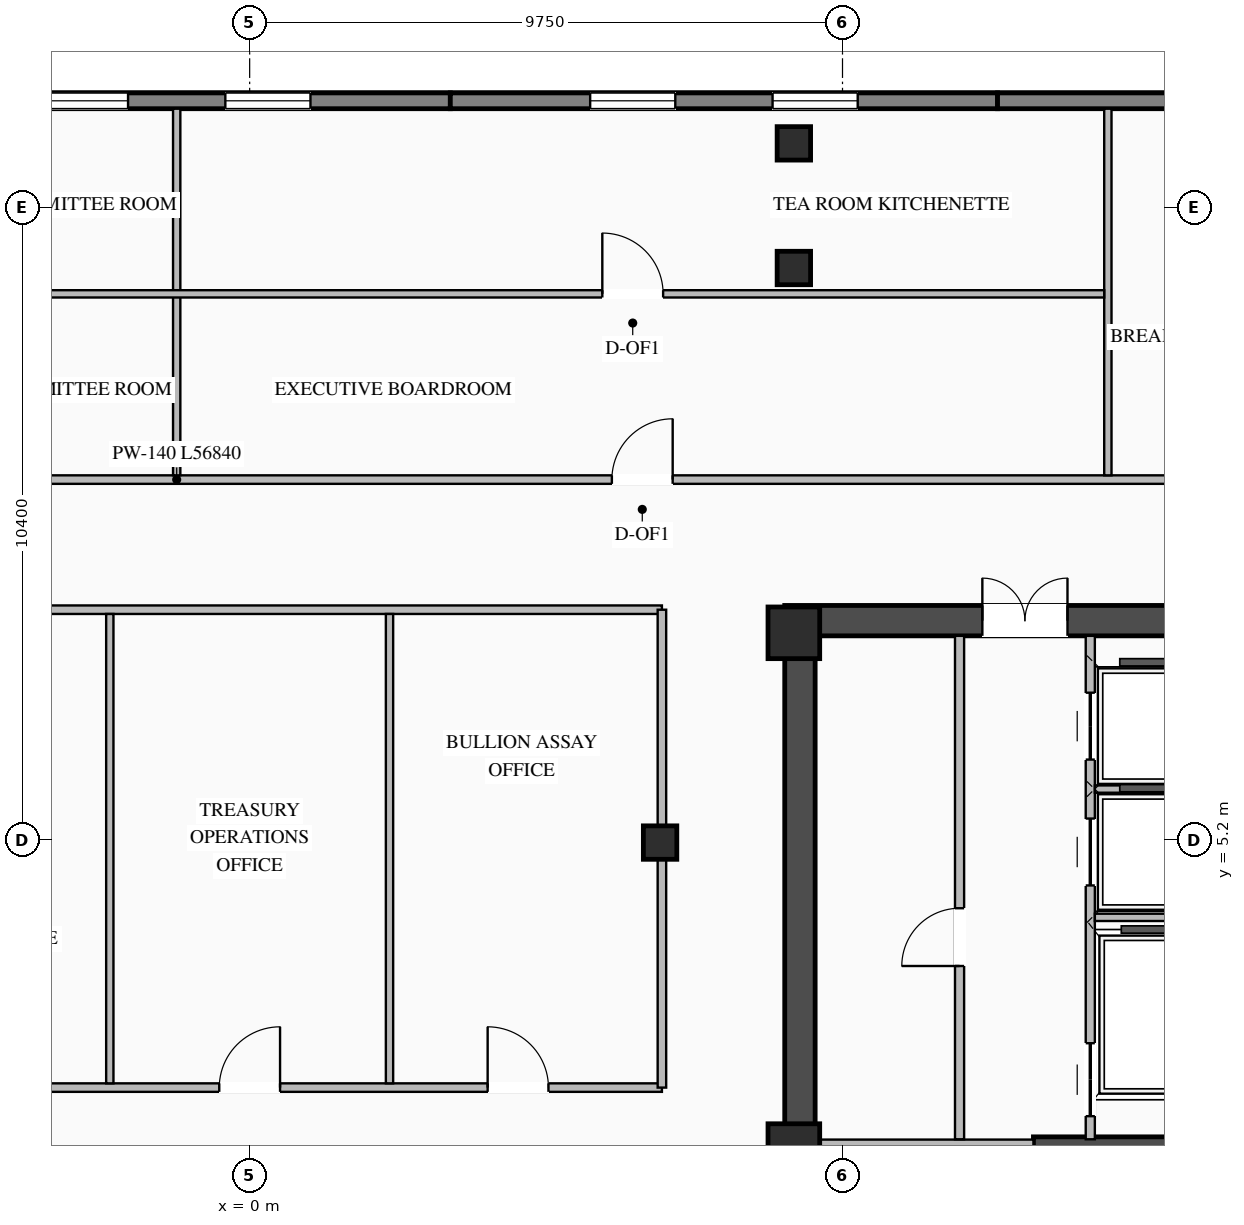
"""IFC4 building model, lengths in metres.
Left out: names, types, materials, properties, quantities, classifications, styles, units other than length and angle.
Written with IfcOpenShell. Run it as: python <this file> out.ifc"""

import sys

from ifc_helpers import new_model, si_unit, direction, frame, frame_2d, origin, origin_2d, place, context, subcontext, project, spatial, rectangle, i_section, extrude, element, fill, save


model = new_model("IFC4")
c1 = context("Model", 3, precision=1e-05, world=origin(), true_north=direction((0.0, 1.0)))
c2 = subcontext(c1, "Body", "Model", "MODEL_VIEW")
j1 = project(units=[si_unit("LENGTHUNIT", "METRE"), si_unit("PLANEANGLEUNIT", "RADIAN")], contexts=[c1])
p1 = place(None, origin())
s1 = spatial("IfcSite", under=j1, at=p1, CompositionType="ELEMENT")
p2 = place(p1, origin())
s2 = spatial("IfcBuilding", under=s1, at=p2, CompositionType="ELEMENT")
p3 = place(p2, frame((0.0, 0.0, 229.2)))
s3 = spatial("IfcBuildingStorey", under=s2, at=p3, CompositionType="ELEMENT", Elevation=229.2)
p4 = place(p3, frame((8.8, 8.8, 0.0), z_axis=(0.0, 0.0, 1.0), x_axis=(1.0, 0.0, 0.0)))
e1 = element("IfcWall", 1, at=p4, inside=s3, PredefinedType="SHEAR", context=c2, shape_type="SweptSolid", body=[
    extrude(rectangle(XDim=10.25, YDim=0.5, at=frame_2d((5.125, 0.0))), origin(), (0.0, 0.0, 1.0), 3.27),
])
p5 = place(p4, frame((3.25, 0.0, 0.0)))
e2 = element("IfcOpeningElement", 2, at=p5, cuts=e1, PredefinedType="OPENING", context=c2, shape_type="SweptSolid", body=[
    extrude(rectangle(XDim=1.4, YDim=2.05, at=frame_2d((0.7, 1.025))), frame((0.0, 0.26, 0.0), z_axis=(0.0, -1.0, 0.0), x_axis=(1.0, 0.0, 0.0)), (0.0, 0.0, 1.0), 0.52),
])
p6 = place(p3, frame((9.05, -8.55, 0.0), z_axis=(0.0, 0.0, 1.0), x_axis=(0.0, 1.0, 0.0)))
e3 = element("IfcWall", 3, at=p6, inside=s3, PredefinedType="SHEAR", context=c2, shape_type="SweptSolid", body=[
    extrude(rectangle(XDim=17.1, YDim=0.5, at=frame_2d((8.55, 0.0))), origin(), (0.0, 0.0, 1.0), 3.27),
])
p7 = place(p6, frame((5.3, 0.0, 0.0)))
e4 = element("IfcOpeningElement", 4, at=p7, cuts=e3, PredefinedType="OPENING", context=c2, shape_type="SweptSolid", body=[
    extrude(rectangle(XDim=1.1, YDim=2.08, at=frame_2d((0.55, 1.04))), frame((0.0, 0.26, 0.0), z_axis=(0.0, -1.0, 0.0), x_axis=(1.0, 0.0, 0.0)), (0.0, 0.0, 1.0), 0.52),
])
p8 = place(p3, frame((18.03, 0.205, 0.0), z_axis=(0.0, 0.0, 1.0), x_axis=(-1.0, 0.0, 0.0)))
e5 = element("IfcWall", 5, at=p8, inside=s3, PredefinedType="SHEAR", context=c2, shape_type="SweptSolid", body=[
    extrude(rectangle(XDim=5.14, YDim=0.21, at=frame_2d((2.57, 0.0))), origin(), (0.0, 0.0, 1.0), 3.27),
])
for number, where, z_axis, x_axis in (
    (6, (8.95, 0.1, 0.0), (0.0, 0.0, 1.0), (1.0, 0.0, 0.0)),
    (7, (8.95, 8.6, 0.0), (0.0, 0.0, 1.0), (1.0, 0.0, 0.0)),
):
    element("IfcColumn", number, at=place(p3, frame(where, z_axis=z_axis, x_axis=x_axis)), inside=s3, PredefinedType="COLUMN", context=c2, shape_type="SweptSolid", body=[
        extrude(rectangle(XDim=0.85, YDim=0.85, at=origin_2d()), origin(), (0.0, 0.0, 1.0), 3.45),
    ])
for number, where, z_axis, x_axis in (
    (8, (6.75, 5.15, 0.0), (0.0, 0.0, 1.0), (1.0, 0.0, 0.0)),
    (9, (8.95, 14.6, 0.0), (0.0, 0.0, 1.0), (1.0, 0.0, 0.0)),
    (10, (8.95, 16.65, 0.0), (0.0, 0.0, 1.0), (1.0, 0.0, 0.0)),
):
    element("IfcColumn", number, at=place(p3, frame(where, z_axis=z_axis, x_axis=x_axis)), inside=s3, PredefinedType="COLUMN", context=c2, shape_type="SweptSolid", body=[
        extrude(i_section(OverallWidth=0.55, OverallDepth=0.55, WebThickness=0.024, FlangeThickness=0.036, at=origin_2d()), origin(), (0.0, 0.0, 1.0), 3.45),
    ])
p9 = place(p3, frame((-5.7, 17.35, 0.0), z_axis=(0.0, 0.0, 1.0), x_axis=(1.0, 0.0, 0.0)))
e11 = element("IfcWall", 11, at=p9, inside=s3, PredefinedType="STANDARD", context=c2, shape_type="SweptSolid", body=[
    extrude(rectangle(XDim=9.0, YDim=0.26, at=frame_2d((4.5, 0.0))), origin(), (0.0, 0.0, 1.0), 3.25),
])
p10 = place(p9, frame((2.3, 0.0, 0.76)))
e12 = element("IfcOpeningElement", 12, at=p10, cuts=e11, PredefinedType="OPENING", context=c2, shape_type="SweptSolid", body=[
    extrude(rectangle(XDim=1.4, YDim=1.95, at=frame_2d((0.7, 0.975))), frame((0.0, 0.14, 0.0), z_axis=(0.0, -1.0, 0.0), x_axis=(1.0, 0.0, 0.0)), (0.0, 0.0, 1.0), 0.28),
])
p11 = place(p9, frame((5.3, 0.0, 0.76)))
e13 = element("IfcOpeningElement", 13, at=p11, cuts=e11, PredefinedType="OPENING", context=c2, shape_type="SweptSolid", body=[
    extrude(rectangle(XDim=1.4, YDim=1.95, at=frame_2d((0.7, 0.975))), frame((0.0, 0.14, 0.0), z_axis=(0.0, -1.0, 0.0), x_axis=(1.0, 0.0, 0.0)), (0.0, 0.0, 1.0), 0.28),
])
p12 = place(p3, frame((3.3, 17.35, 0.0), z_axis=(0.0, 0.0, 1.0), x_axis=(1.0, 0.0, 0.0)))
e14 = element("IfcWall", 14, at=p12, inside=s3, PredefinedType="STANDARD", context=c2, shape_type="SweptSolid", body=[
    extrude(rectangle(XDim=9.0, YDim=0.26, at=frame_2d((4.5, 0.0))), origin(), (0.0, 0.0, 1.0), 3.25),
])
p13 = place(p12, frame((2.3, 0.0, 0.76)))
e15 = element("IfcOpeningElement", 15, at=p13, cuts=e14, PredefinedType="OPENING", context=c2, shape_type="SweptSolid", body=[
    extrude(rectangle(XDim=1.4, YDim=1.95, at=frame_2d((0.7, 0.975))), frame((0.0, 0.14, 0.0), z_axis=(0.0, -1.0, 0.0), x_axis=(1.0, 0.0, 0.0)), (0.0, 0.0, 1.0), 0.28),
])
p14 = place(p12, frame((5.3, 0.0, 0.76)))
e16 = element("IfcOpeningElement", 16, at=p14, cuts=e14, PredefinedType="OPENING", context=c2, shape_type="SweptSolid", body=[
    extrude(rectangle(XDim=1.4, YDim=1.95, at=frame_2d((0.7, 0.975))), frame((0.0, 0.14, 0.0), z_axis=(0.0, -1.0, 0.0), x_axis=(1.0, 0.0, 0.0)), (0.0, 0.0, 1.0), 0.28),
])
p15 = place(p3, frame((12.3, 17.35, 0.0), z_axis=(0.0, 0.0, 1.0), x_axis=(1.0, 0.0, 0.0)))
e17 = element("IfcWall", 17, at=p15, inside=s3, PredefinedType="STANDARD", context=c2, shape_type="SweptSolid", body=[
    extrude(rectangle(XDim=12.65, YDim=0.26, at=frame_2d((6.325, 0.0))), origin(), (0.0, 0.0, 1.0), 3.25),
])
p16 = place(p15, frame((3.517, 0.0, 0.76)))
e18 = element("IfcOpeningElement", 18, at=p16, cuts=e17, PredefinedType="OPENING", context=c2, shape_type="SweptSolid", body=[
    extrude(rectangle(XDim=1.4, YDim=1.95, at=frame_2d((0.7, 0.975))), frame((0.0, 0.14, 0.0), z_axis=(0.0, -1.0, 0.0), x_axis=(1.0, 0.0, 0.0)), (0.0, 0.0, 1.0), 0.28),
])
p17 = place(p15, frame((7.733, 0.0, 0.76)))
e19 = element("IfcOpeningElement", 19, at=p17, cuts=e17, PredefinedType="OPENING", context=c2, shape_type="SweptSolid", body=[
    extrude(rectangle(XDim=1.4, YDim=1.95, at=frame_2d((0.7, 0.975))), frame((0.0, 0.14, 0.0), z_axis=(0.0, -1.0, 0.0), x_axis=(1.0, 0.0, 0.0)), (0.0, 0.0, 1.0), 0.28),
])
p18 = place(p3, frame((9.3, 0.19, 0.0), z_axis=(0.0, 0.0, 1.0), x_axis=(1.0, 0.0, 0.0)))
e20 = element("IfcWall", 20, at=p18, inside=s3, PredefinedType="STANDARD", context=c2, shape_type="SweptSolid", body=[
    extrude(rectangle(XDim=3.59, YDim=0.15, at=frame_2d((1.795, 0.0))), origin(), (0.0, 0.0, 1.0), 2.645),
])
p19 = place(p3, frame((11.675, 0.27, 0.0), z_axis=(0.0, 0.0, 1.0), x_axis=(0.0, 1.0, 0.0)))
e21 = element("IfcWall", 21, at=p19, inside=s3, PredefinedType="STANDARD", context=c2, shape_type="SweptSolid", body=[
    extrude(rectangle(XDim=8.28, YDim=0.15, at=frame_2d((4.14, 0.0))), origin(), (0.0, 0.0, 1.0), 3.25),
])
p20 = place(p19, frame((2.85, 0.0, 0.0)))
e22 = element("IfcOpeningElement", 22, at=p20, cuts=e21, PredefinedType="OPENING", context=c2, shape_type="SweptSolid", body=[
    extrude(rectangle(XDim=0.95, YDim=2.05, at=frame_2d((0.475, 1.025))), frame((0.0, 0.085, 0.0), z_axis=(0.0, -1.0, 0.0), x_axis=(1.0, 0.0, 0.0)), (0.0, 0.0, 1.0), 0.17),
])
p21 = place(p3, frame((13.825, 0.27, 0.0), z_axis=(0.0, 0.0, 1.0), x_axis=(0.0, 1.0, 0.0)))
e23 = element("IfcWall", 23, at=p21, inside=s3, PredefinedType="STANDARD", context=c2, shape_type="SweptSolid", body=[
    extrude(rectangle(XDim=8.28, YDim=0.15, at=frame_2d((4.14, 0.0))), origin(), (0.0, 0.0, 1.0), 3.25),
])
p22 = place(p21, frame((4.175, 0.0, 0.0)))
e24 = element("IfcOpeningElement", 24, at=p22, cuts=e23, PredefinedType="OPENING", context=c2, shape_type="SweptSolid", body=[
    extrude(rectangle(XDim=1.1, YDim=2.1, at=frame_2d((0.55, 1.05))), frame((0.0, 0.085, 0.0), z_axis=(0.0, -1.0, 0.0), x_axis=(1.0, 0.0, 0.0)), (0.0, 0.0, 1.0), 0.17),
])
p23 = place(p21, frame((6.245, 0.0, 0.0)))
e25 = element("IfcOpeningElement", 25, at=p23, cuts=e23, PredefinedType="OPENING", context=c2, shape_type="SweptSolid", body=[
    extrude(rectangle(XDim=1.1, YDim=2.1, at=frame_2d((0.55, 1.05))), frame((0.0, 0.085, 0.0), z_axis=(0.0, -1.0, 0.0), x_axis=(1.0, 0.0, 0.0)), (0.0, 0.0, 1.0), 0.17),
])
p24 = place(p21, frame((0.38, 0.0, 0.0)))
e26 = element("IfcOpeningElement", 26, at=p24, cuts=e23, PredefinedType="OPENING", context=c2, shape_type="SweptSolid", body=[
    extrude(rectangle(XDim=1.2, YDim=2.1, at=frame_2d((0.6, 1.05))), frame((0.0, 0.085, 0.0), z_axis=(0.0, -1.0, 0.0), x_axis=(1.0, 0.0, 0.0)), (0.0, 0.0, 1.0), 0.17),
])
p25 = place(p3, frame((13.9, 3.92, 0.0), z_axis=(0.0, 0.0, 1.0), x_axis=(1.0, 0.0, 0.0)))
e27 = element("IfcWall", 27, at=p25, inside=s3, PredefinedType="STANDARD", context=c2, shape_type="SweptSolid", body=[
    extrude(rectangle(XDim=4.65, YDim=0.12, at=frame_2d((2.325, 0.0))), origin(), (0.0, 0.0, 1.0), 3.25),
])
p26 = place(p3, frame((13.9, 6.03, 0.0), z_axis=(0.0, 0.0, 1.0), x_axis=(1.0, 0.0, 0.0)))
e28 = element("IfcWall", 28, at=p26, inside=s3, PredefinedType="STANDARD", context=c2, shape_type="SweptSolid", body=[
    extrude(rectangle(XDim=2.1, YDim=0.12, at=frame_2d((1.05, 0.0))), origin(), (0.0, 0.0, 1.0), 3.25),
])
p27 = place(p3, frame((-29.62, 11.12, 0.0), z_axis=(0.0, 0.0, 1.0), x_axis=(1.0, 0.0, 0.0)))
e29 = element("IfcWall", 29, at=p27, inside=s3, PredefinedType="STANDARD", context=c2, shape_type="SweptSolid", body=[
    extrude(rectangle(XDim=56.84, YDim=0.14, at=frame_2d((28.42, 0.0))), origin(), (0.0, 0.0, 1.0), 3.25),
])
p28 = place(p27, frame((6.179, 0.0, 0.0)))
e30 = element("IfcOpeningElement", 30, at=p28, cuts=e29, PredefinedType="OPENING", context=c2, shape_type="SweptSolid", body=[
    extrude(rectangle(XDim=1.0, YDim=2.08, at=frame_2d((0.5, 1.04))), frame((0.0, 0.08, 0.0), z_axis=(0.0, -1.0, 0.0), x_axis=(1.0, 0.0, 0.0)), (0.0, 0.0, 1.0), 0.16),
])
p29 = place(p27, frame((20.263, 0.0, 0.0)))
e31 = element("IfcOpeningElement", 31, at=p29, cuts=e29, PredefinedType="OPENING", context=c2, shape_type="SweptSolid", body=[
    extrude(rectangle(XDim=1.0, YDim=2.08, at=frame_2d((0.5, 1.04))), frame((0.0, 0.08, 0.0), z_axis=(0.0, -1.0, 0.0), x_axis=(1.0, 0.0, 0.0)), (0.0, 0.0, 1.0), 0.16),
])
p30 = place(p27, frame((35.577, 0.0, 0.0)))
e32 = element("IfcOpeningElement", 32, at=p30, cuts=e29, PredefinedType="OPENING", context=c2, shape_type="SweptSolid", body=[
    extrude(rectangle(XDim=1.0, YDim=2.08, at=frame_2d((0.5, 1.04))), frame((0.0, 0.08, 0.0), z_axis=(0.0, -1.0, 0.0), x_axis=(1.0, 0.0, 0.0)), (0.0, 0.0, 1.0), 0.16),
])
p31 = place(p27, frame((49.661, 0.0, 0.0)))
e33 = element("IfcOpeningElement", 33, at=p31, cuts=e29, PredefinedType="OPENING", context=c2, shape_type="SweptSolid", body=[
    extrude(rectangle(XDim=1.0, YDim=2.08, at=frame_2d((0.5, 1.04))), frame((0.0, 0.08, 0.0), z_axis=(0.0, -1.0, 0.0), x_axis=(1.0, 0.0, 0.0)), (0.0, 0.0, 1.0), 0.16),
])
for number, where, z_axis, x_axis in (
    (34, (-1.2, 11.19, 0.0), (0.0, 0.0, 1.0), (0.0, 1.0, 0.0)),
    (35, (14.114, 11.19, 0.0), (0.0, 0.0, 1.0), (0.0, 1.0, 0.0)),
):
    element("IfcWall", number, at=place(p3, frame(where, z_axis=z_axis, x_axis=x_axis)), inside=s3, PredefinedType="STANDARD", context=c2, shape_type="SweptSolid", body=[
        extrude(rectangle(XDim=6.03, YDim=0.12, at=frame_2d((3.015, 0.0))), origin(), (0.0, 0.0, 1.0), 3.25),
    ])
p32 = place(p3, frame((-16.454, 14.175, 0.0), z_axis=(0.0, 0.0, 1.0), x_axis=(1.0, 0.0, 0.0)))
e36 = element("IfcWall", 36, at=p32, inside=s3, PredefinedType="STANDARD", context=c2, shape_type="SweptSolid", body=[
    extrude(rectangle(XDim=30.508, YDim=0.12, at=frame_2d((15.254, 0.0))), origin(), (0.0, 0.0, 1.0), 3.25),
])
p33 = place(p32, frame((0.32, 0.0, 0.0)))
e37 = element("IfcOpeningElement", 37, at=p33, cuts=e36, PredefinedType="OPENING", context=c2, shape_type="SweptSolid", body=[
    extrude(rectangle(XDim=1.0, YDim=2.08, at=frame_2d((0.5, 1.04))), frame((0.0, 0.07, 0.0), z_axis=(0.0, -1.0, 0.0), x_axis=(1.0, 0.0, 0.0)), (0.0, 0.0, 1.0), 0.14),
])
p34 = place(p32, frame((22.254, 0.0, 0.0)))
e38 = element("IfcOpeningElement", 38, at=p34, cuts=e36, PredefinedType="OPENING", context=c2, shape_type="SweptSolid", body=[
    extrude(rectangle(XDim=1.0, YDim=2.08, at=frame_2d((0.5, 1.04))), frame((0.0, 0.07, 0.0), z_axis=(0.0, -1.0, 0.0), x_axis=(1.0, 0.0, 0.0)), (0.0, 0.0, 1.0), 0.14),
])
p35 = place(p3, frame((-6.78, 1.12, 0.0), z_axis=(0.0, 0.0, 1.0), x_axis=(1.0, 0.0, 0.0)))
e39 = element("IfcWall", 39, at=p35, inside=s3, PredefinedType="STANDARD", context=c2, shape_type="SweptSolid", body=[
    extrude(rectangle(XDim=13.56, YDim=0.14, at=frame_2d((6.78, 0.0))), origin(), (0.0, 0.0, 1.0), 3.25),
])
p36 = place(p35, frame((1.866, 0.0, 0.0)))
e40 = element("IfcOpeningElement", 40, at=p36, cuts=e39, PredefinedType="OPENING", context=c2, shape_type="SweptSolid", body=[
    extrude(rectangle(XDim=1.0, YDim=2.08, at=frame_2d((0.5, 1.04))), frame((0.0, 0.08, 0.0), z_axis=(0.0, -1.0, 0.0), x_axis=(1.0, 0.0, 0.0)), (0.0, 0.0, 1.0), 0.16),
])
p37 = place(p35, frame((6.28, 0.0, 0.0)))
e41 = element("IfcOpeningElement", 41, at=p37, cuts=e39, PredefinedType="OPENING", context=c2, shape_type="SweptSolid", body=[
    extrude(rectangle(XDim=1.0, YDim=2.08, at=frame_2d((0.5, 1.04))), frame((0.0, 0.08, 0.0), z_axis=(0.0, -1.0, 0.0), x_axis=(1.0, 0.0, 0.0)), (0.0, 0.0, 1.0), 0.16),
])
p38 = place(p35, frame((10.694, 0.0, 0.0)))
e42 = element("IfcOpeningElement", 42, at=p38, cuts=e39, PredefinedType="OPENING", context=c2, shape_type="SweptSolid", body=[
    extrude(rectangle(XDim=1.0, YDim=2.08, at=frame_2d((0.5, 1.04))), frame((0.0, 0.08, 0.0), z_axis=(0.0, -1.0, 0.0), x_axis=(1.0, 0.0, 0.0)), (0.0, 0.0, 1.0), 0.16),
])
p39 = place(p3, frame((-6.78, 8.98, 0.0), z_axis=(0.0, 0.0, 1.0), x_axis=(1.0, 0.0, 0.0)))
e43 = element("IfcWall", 43, at=p39, inside=s3, PredefinedType="STANDARD", context=c2, shape_type="SweptSolid", body=[
    extrude(rectangle(XDim=13.56, YDim=0.14, at=frame_2d((6.78, 0.0))), origin(), (0.0, 0.0, 1.0), 3.25),
])
p40 = place(p3, frame((6.78, 1.12, 0.0), z_axis=(0.0, 0.0, 1.0), x_axis=(0.0, 1.0, 0.0)))
e44 = element("IfcWall", 44, at=p40, inside=s3, PredefinedType="STANDARD", context=c2, shape_type="SweptSolid", body=[
    extrude(rectangle(XDim=7.86, YDim=0.14, at=frame_2d((3.93, 0.0))), origin(), (0.0, 0.0, 1.0), 2.645),
])
for number, where, z_axis, x_axis in (
    (45, (-2.3, 1.19, 0.0), (0.0, 0.0, 1.0), (0.0, 1.0, 0.0)),
    (46, (2.3, 1.19, 0.0), (0.0, 0.0, 1.0), (0.0, 1.0, 0.0)),
):
    element("IfcWall", number, at=place(p3, frame(where, z_axis=z_axis, x_axis=x_axis)), inside=s3, PredefinedType="STANDARD", context=c2, shape_type="SweptSolid", body=[
        extrude(rectangle(XDim=7.72, YDim=0.12, at=frame_2d((3.86, 0.0))), origin(), (0.0, 0.0, 1.0), 3.25),
    ])
p41 = place(p10, origin())
e47 = element("IfcWindow", 47, at=p41, inside=s3, PartitioningType="SINGLE_PANEL", PredefinedType="WINDOW", context=c2, shape_type="SweptSolid", body=[
    extrude(rectangle(XDim=1.4, YDim=1.95, at=frame_2d((0.7, 0.975))), frame((0.0, 0.03, 0.0), z_axis=(0.0, -1.0, 0.0), x_axis=(1.0, 0.0, 0.0)), (0.0, 0.0, 1.0), 0.06),
])
fill(e12, e47)
p42 = place(p11, origin())
e48 = element("IfcWindow", 48, at=p42, inside=s3, PartitioningType="SINGLE_PANEL", PredefinedType="WINDOW", context=c2, shape_type="SweptSolid", body=[
    extrude(rectangle(XDim=1.4, YDim=1.95, at=frame_2d((0.7, 0.975))), frame((0.0, 0.03, 0.0), z_axis=(0.0, -1.0, 0.0), x_axis=(1.0, 0.0, 0.0)), (0.0, 0.0, 1.0), 0.06),
])
fill(e13, e48)
p43 = place(p13, origin())
e49 = element("IfcWindow", 49, at=p43, inside=s3, PartitioningType="SINGLE_PANEL", PredefinedType="WINDOW", context=c2, shape_type="SweptSolid", body=[
    extrude(rectangle(XDim=1.4, YDim=1.95, at=frame_2d((0.7, 0.975))), frame((0.0, 0.03, 0.0), z_axis=(0.0, -1.0, 0.0), x_axis=(1.0, 0.0, 0.0)), (0.0, 0.0, 1.0), 0.06),
])
fill(e15, e49)
p44 = place(p14, origin())
e50 = element("IfcWindow", 50, at=p44, inside=s3, PartitioningType="SINGLE_PANEL", PredefinedType="WINDOW", context=c2, shape_type="SweptSolid", body=[
    extrude(rectangle(XDim=1.4, YDim=1.95, at=frame_2d((0.7, 0.975))), frame((0.0, 0.03, 0.0), z_axis=(0.0, -1.0, 0.0), x_axis=(1.0, 0.0, 0.0)), (0.0, 0.0, 1.0), 0.06),
])
fill(e16, e50)
p45 = place(p5, origin())
e51 = element("IfcDoor", 51, at=p45, inside=s3, OperationType="DOUBLE_DOOR_SINGLE_SWING", PredefinedType="DOOR", context=c2, shape_type="SweptSolid", body=[
    extrude(rectangle(XDim=1.4, YDim=2.05, at=frame_2d((0.7, 1.025))), frame((0.0, 0.195, 0.0), z_axis=(0.0, -1.0, 0.0), x_axis=(1.0, 0.0, 0.0)), (0.0, 0.0, 1.0), 0.05),
])
fill(e2, e51)
p46 = place(p20, origin())
e52 = element("IfcDoor", 52, at=p46, inside=s3, OperationType="SINGLE_SWING_LEFT", PredefinedType="DOOR", context=c2, shape_type="SweptSolid", body=[
    extrude(rectangle(XDim=0.95, YDim=2.05, at=frame_2d((0.475, 1.025))), frame((0.0, 0.025, 0.0), z_axis=(0.0, -1.0, 0.0), x_axis=(1.0, 0.0, 0.0)), (0.0, 0.0, 1.0), 0.05),
])
fill(e22, e52)
p47 = place(p22, origin())
e53 = element("IfcDoor", 53, at=p47, inside=s3, OperationType="DOUBLE_DOOR_SLIDING", PredefinedType="DOOR", context=c2, shape_type="SweptSolid", body=[
    extrude(rectangle(XDim=1.1, YDim=2.1, at=frame_2d((0.55, 1.05))), frame((0.0, 0.025, 0.0), z_axis=(0.0, -1.0, 0.0), x_axis=(1.0, 0.0, 0.0)), (0.0, 0.0, 1.0), 0.05),
])
fill(e24, e53)
p48 = place(p23, origin())
e54 = element("IfcDoor", 54, at=p48, inside=s3, OperationType="DOUBLE_DOOR_SLIDING", PredefinedType="DOOR", context=c2, shape_type="SweptSolid", body=[
    extrude(rectangle(XDim=1.1, YDim=2.1, at=frame_2d((0.55, 1.05))), frame((0.0, 0.025, 0.0), z_axis=(0.0, -1.0, 0.0), x_axis=(1.0, 0.0, 0.0)), (0.0, 0.0, 1.0), 0.05),
])
fill(e25, e54)
p49 = place(p24, origin())
e55 = element("IfcDoor", 55, at=p49, inside=s3, OperationType="DOUBLE_DOOR_SLIDING", PredefinedType="DOOR", context=c2, shape_type="SweptSolid", body=[
    extrude(rectangle(XDim=1.2, YDim=2.1, at=frame_2d((0.6, 1.05))), frame((0.0, 0.025, 0.0), z_axis=(0.0, -1.0, 0.0), x_axis=(1.0, 0.0, 0.0)), (0.0, 0.0, 1.0), 0.05),
])
fill(e26, e55)
p50 = place(p30, origin())
e56 = element("IfcDoor", 56, at=p50, inside=s3, OperationType="SINGLE_SWING_RIGHT", PredefinedType="DOOR", context=c2, shape_type="SweptSolid", body=[
    extrude(rectangle(XDim=1.0, YDim=2.08, at=frame_2d((0.5, 1.04))), frame((0.0, 0.025, 0.0), z_axis=(0.0, -1.0, 0.0), x_axis=(1.0, 0.0, 0.0)), (0.0, 0.0, 1.0), 0.05),
])
fill(e32, e56)
p51 = place(p34, origin())
e57 = element("IfcDoor", 57, at=p51, inside=s3, OperationType="SINGLE_SWING_LEFT", PredefinedType="DOOR", context=c2, shape_type="SweptSolid", body=[
    extrude(rectangle(XDim=1.0, YDim=2.08, at=frame_2d((0.5, 1.04))), frame((0.0, 0.025, 0.0), z_axis=(0.0, -1.0, 0.0), x_axis=(1.0, 0.0, 0.0)), (0.0, 0.0, 1.0), 0.05),
])
fill(e38, e57)
p52 = place(p37, origin())
e58 = element("IfcDoor", 58, at=p52, inside=s3, OperationType="SINGLE_SWING_RIGHT", PredefinedType="DOOR", context=c2, shape_type="SweptSolid", body=[
    extrude(rectangle(XDim=1.0, YDim=2.08, at=frame_2d((0.5, 1.04))), frame((0.0, 0.025, 0.0), z_axis=(0.0, -1.0, 0.0), x_axis=(1.0, 0.0, 0.0)), (0.0, 0.0, 1.0), 0.05),
])
fill(e41, e58)
p53 = place(p38, origin())
e59 = element("IfcDoor", 59, at=p53, inside=s3, OperationType="SINGLE_SWING_LEFT", PredefinedType="DOOR", context=c2, shape_type="SweptSolid", body=[
    extrude(rectangle(XDim=1.0, YDim=2.08, at=frame_2d((0.5, 1.04))), frame((0.0, 0.025, 0.0), z_axis=(0.0, -1.0, 0.0), x_axis=(1.0, 0.0, 0.0)), (0.0, 0.0, 1.0), 0.05),
])
fill(e42, e59)
save(model, sys.argv[1])
